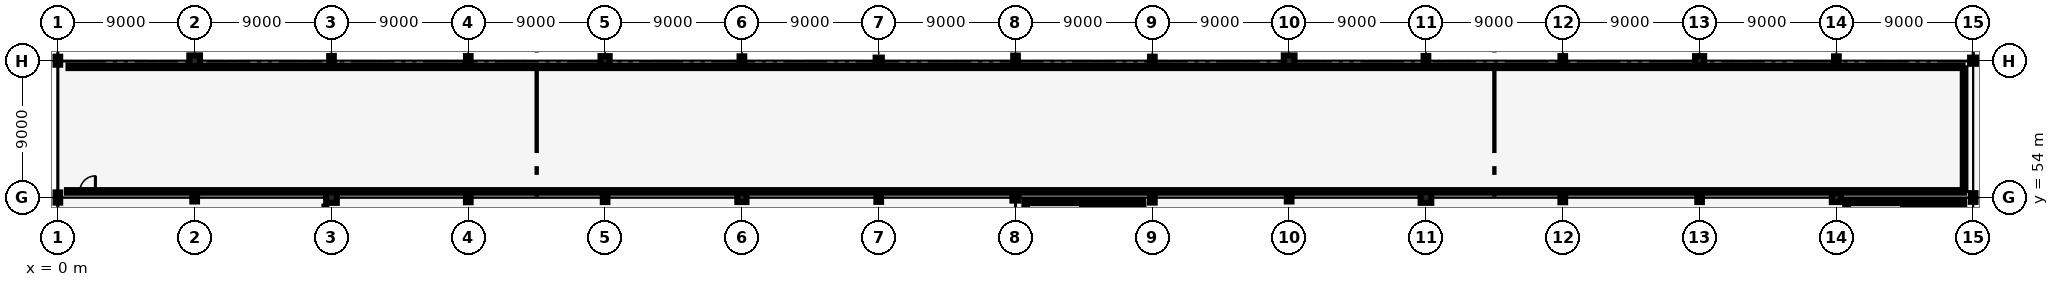
"""IFC4 building model, lengths in metres.
Left out: names, types, materials, properties, quantities, classifications, styles, units other than length and angle.
Written with IfcOpenShell. Run it as: python <this file> out.ifc"""

import sys

from ifc_helpers import new_model, si_unit, direction, frame, frame_2d, origin, origin_2d, place, context, subcontext, project, spatial, rectangle, hollow_circle, i_section, extrude, element, fill, save


model = new_model("IFC4")
c1 = context("Model", 3, precision=1e-05, world=origin(), true_north=direction((0.0, 1.0)))
c2 = subcontext(c1, "Body", "Model", "MODEL_VIEW")
j1 = project(units=[si_unit("LENGTHUNIT", "METRE"), si_unit("PLANEANGLEUNIT", "RADIAN")], contexts=[c1])
p1 = place(None, origin())
s1 = spatial("IfcSite", under=j1, at=p1, CompositionType="ELEMENT")
p2 = place(p1, origin())
s2 = spatial("IfcBuilding", under=s1, at=p2, CompositionType="ELEMENT")
p3 = place(p2, frame((0.0, 0.0, 12.0)))
s3 = spatial("IfcBuildingStorey", under=s2, at=p3, CompositionType="ELEMENT", Elevation=12.0)
p4 = place(p3, frame((0.0, 54.0, 0.0), z_axis=(0.0, 0.0, 1.0), x_axis=(1.0, 0.0, 0.0)))
e1 = element("IfcColumn", 1, at=p4, inside=s3, PredefinedType="COLUMN", context=c2, shape_type="SweptSolid", body=[
    extrude(i_section(OverallWidth=0.305, OverallDepth=0.668, WebThickness=0.021, FlangeThickness=0.04, FilletRadius=0.027, at=origin_2d()), origin(), (0.0, 0.0, 1.0), 6.0),
])
p5 = place(p3, frame((0.0, 63.0, 0.0), z_axis=(0.0, 0.0, 1.0), x_axis=(1.0, 0.0, 0.0)))
e2 = element("IfcColumn", 2, at=p5, inside=s3, PredefinedType="COLUMN", context=c2, shape_type="SweptSolid", body=[
    extrude(i_section(OverallWidth=0.306, OverallDepth=0.524, WebThickness=0.021, FlangeThickness=0.04, FilletRadius=0.027, at=origin_2d()), origin(), (0.0, 0.0, 1.0), 5.655),
])
p6 = place(p3, frame((9.0, 54.0, 0.0), z_axis=(0.0, 0.0, 1.0), x_axis=(1.0, 0.0, 0.0)))
e3 = element("IfcColumn", 3, at=p6, inside=s3, PredefinedType="COLUMN", context=c2, shape_type="SweptSolid", body=[
    extrude(i_section(OverallWidth=0.306, OverallDepth=0.524, WebThickness=0.021, FlangeThickness=0.04, FilletRadius=0.027, at=origin_2d()), origin(), (0.0, 0.0, 1.0), 6.0),
])
p7 = place(p3, frame((9.0, 63.0, 0.0), z_axis=(0.0, 0.0, 1.0), x_axis=(1.0, 0.0, 0.0)))
e4 = element("IfcColumn", 4, at=p7, inside=s3, PredefinedType="COLUMN", context=c2, shape_type="SweptSolid", body=[
    extrude(rectangle(XDim=0.7, YDim=0.7, at=origin_2d()), origin(), (0.0, 0.0, 1.0), 5.655),
])
p8 = place(p3, frame((18.0, 54.0, 0.0), z_axis=(0.0, 0.0, 1.0), x_axis=(1.0, 0.0, 0.0)))
e5 = element("IfcColumn", 5, at=p8, inside=s3, PredefinedType="COLUMN", context=c2, shape_type="SweptSolid", body=[
    extrude(rectangle(XDim=0.7, YDim=0.7, at=origin_2d()), origin(), (0.0, 0.0, 1.0), 6.0),
])
p9 = place(p3, frame((18.0, 63.0, 0.0), z_axis=(0.0, 0.0, 1.0), x_axis=(1.0, 0.0, 0.0)))
e6 = element("IfcColumn", 6, at=p9, inside=s3, PredefinedType="COLUMN", context=c2, shape_type="SweptSolid", body=[
    extrude(i_section(OverallWidth=0.305, OverallDepth=0.62, WebThickness=0.021, FlangeThickness=0.04, FilletRadius=0.027, at=origin_2d()), origin(), (0.0, 0.0, 1.0), 5.655),
])
p10 = place(p3, frame((27.0, 54.0, 0.0), z_axis=(0.0, 0.0, 1.0), x_axis=(1.0, 0.0, 0.0)))
e7 = element("IfcColumn", 7, at=p10, inside=s3, PredefinedType="COLUMN", context=c2, shape_type="SweptSolid", body=[
    extrude(i_section(OverallWidth=0.305, OverallDepth=0.62, WebThickness=0.021, FlangeThickness=0.04, FilletRadius=0.027, at=origin_2d()), origin(), (0.0, 0.0, 1.0), 6.0),
])
p11 = place(p3, frame((27.0, 63.0, 0.0), z_axis=(0.0, 0.0, 1.0), x_axis=(1.0, 0.0, 0.0)))
e8 = element("IfcColumn", 8, at=p11, inside=s3, PredefinedType="COLUMN", context=c2, shape_type="SweptSolid", body=[
    extrude(i_section(OverallWidth=0.3, OverallDepth=0.6, WebThickness=0.015, FlangeThickness=0.03, FilletRadius=0.027, at=origin_2d()), origin(), (0.0, 0.0, 1.0), 5.655),
])
p12 = place(p3, frame((36.0, 54.0, 0.0), z_axis=(0.0, 0.0, 1.0), x_axis=(1.0, 0.0, 0.0)))
e9 = element("IfcColumn", 9, at=p12, inside=s3, PredefinedType="COLUMN", context=c2, shape_type="SweptSolid", body=[
    extrude(i_section(OverallWidth=0.3, OverallDepth=0.6, WebThickness=0.015, FlangeThickness=0.03, FilletRadius=0.027, at=origin_2d()), origin(), (0.0, 0.0, 1.0), 6.0),
])
p13 = place(p3, frame((36.0, 63.0, 0.0), z_axis=(0.0, 0.0, 1.0), x_axis=(1.0, 0.0, 0.0)))
e10 = element("IfcColumn", 10, at=p13, inside=s3, PredefinedType="COLUMN", context=c2, shape_type="SweptSolid", body=[
    extrude(rectangle(XDim=0.6, YDim=0.6, at=origin_2d()), origin(), (0.0, 0.0, 1.0), 5.655),
])
p14 = place(p3, frame((45.0, 54.0, 0.0), z_axis=(0.0, 0.0, 1.0), x_axis=(1.0, 0.0, 0.0)))
e11 = element("IfcColumn", 11, at=p14, inside=s3, PredefinedType="COLUMN", context=c2, shape_type="SweptSolid", body=[
    extrude(rectangle(XDim=0.6, YDim=0.6, at=origin_2d()), origin(), (0.0, 0.0, 1.0), 6.0),
])
p15 = place(p3, frame((45.0, 63.0, 0.0), z_axis=(0.0, 0.0, 1.0), x_axis=(1.0, 0.0, 0.0)))
e12 = element("IfcColumn", 12, at=p15, inside=s3, PredefinedType="COLUMN", context=c2, shape_type="SweptSolid", body=[
    extrude(i_section(OverallWidth=0.306, OverallDepth=0.572, WebThickness=0.021, FlangeThickness=0.04, FilletRadius=0.027, at=origin_2d()), origin(), (0.0, 0.0, 1.0), 5.655),
])
p16 = place(p3, frame((54.0, 54.0, 0.0), z_axis=(0.0, 0.0, 1.0), x_axis=(1.0, 0.0, 0.0)))
e13 = element("IfcColumn", 13, at=p16, inside=s3, PredefinedType="COLUMN", context=c2, shape_type="SweptSolid", body=[
    extrude(i_section(OverallWidth=0.306, OverallDepth=0.572, WebThickness=0.021, FlangeThickness=0.04, FilletRadius=0.027, at=origin_2d()), origin(), (0.0, 0.0, 1.0), 6.0),
])
p17 = place(p3, frame((54.0, 63.0, 0.0), z_axis=(0.0, 0.0, 1.0), x_axis=(1.0, 0.0, 0.0)))
e14 = element("IfcColumn", 14, at=p17, inside=s3, PredefinedType="COLUMN", context=c2, shape_type="SweptSolid", body=[
    extrude(hollow_circle(Radius=0.203, WallThickness=0.016, at=origin_2d()), origin(), (0.0, 0.0, 1.0), 5.655),
])
p18 = place(p3, frame((63.0, 54.0, 0.0), z_axis=(0.0, 0.0, 1.0), x_axis=(1.0, 0.0, 0.0)))
e15 = element("IfcColumn", 15, at=p18, inside=s3, PredefinedType="COLUMN", context=c2, shape_type="SweptSolid", body=[
    extrude(hollow_circle(Radius=0.203, WallThickness=0.016, at=origin_2d()), origin(), (0.0, 0.0, 1.0), 6.0),
])
p19 = place(p3, frame((63.0, 63.0, 0.0), z_axis=(0.0, 0.0, 1.0), x_axis=(1.0, 0.0, 0.0)))
e16 = element("IfcColumn", 16, at=p19, inside=s3, PredefinedType="COLUMN", context=c2, shape_type="SweptSolid", body=[
    extrude(i_section(OverallWidth=0.305, OverallDepth=0.668, WebThickness=0.021, FlangeThickness=0.04, FilletRadius=0.027, at=origin_2d()), origin(), (0.0, 0.0, 1.0), 5.655),
])
p20 = place(p3, frame((72.0, 54.0, 0.0), z_axis=(0.0, 0.0, 1.0), x_axis=(1.0, 0.0, 0.0)))
e17 = element("IfcColumn", 17, at=p20, inside=s3, PredefinedType="COLUMN", context=c2, shape_type="SweptSolid", body=[
    extrude(i_section(OverallWidth=0.305, OverallDepth=0.668, WebThickness=0.021, FlangeThickness=0.04, FilletRadius=0.027, at=origin_2d()), origin(), (0.0, 0.0, 1.0), 6.0),
])
p21 = place(p3, frame((72.0, 63.0, 0.0), z_axis=(0.0, 0.0, 1.0), x_axis=(1.0, 0.0, 0.0)))
e18 = element("IfcColumn", 18, at=p21, inside=s3, PredefinedType="COLUMN", context=c2, shape_type="SweptSolid", body=[
    extrude(i_section(OverallWidth=0.306, OverallDepth=0.524, WebThickness=0.021, FlangeThickness=0.04, FilletRadius=0.027, at=origin_2d()), origin(), (0.0, 0.0, 1.0), 5.655),
])
p22 = place(p3, frame((81.0, 54.0, 0.0), z_axis=(0.0, 0.0, 1.0), x_axis=(1.0, 0.0, 0.0)))
e19 = element("IfcColumn", 19, at=p22, inside=s3, PredefinedType="COLUMN", context=c2, shape_type="SweptSolid", body=[
    extrude(i_section(OverallWidth=0.306, OverallDepth=0.524, WebThickness=0.021, FlangeThickness=0.04, FilletRadius=0.027, at=origin_2d()), origin(), (0.0, 0.0, 1.0), 6.0),
])
p23 = place(p3, frame((81.0, 63.0, 0.0), z_axis=(0.0, 0.0, 1.0), x_axis=(1.0, 0.0, 0.0)))
e20 = element("IfcColumn", 20, at=p23, inside=s3, PredefinedType="COLUMN", context=c2, shape_type="SweptSolid", body=[
    extrude(rectangle(XDim=0.7, YDim=0.7, at=origin_2d()), origin(), (0.0, 0.0, 1.0), 5.655),
])
p24 = place(p3, frame((90.0, 54.0, 0.0), z_axis=(0.0, 0.0, 1.0), x_axis=(1.0, 0.0, 0.0)))
e21 = element("IfcColumn", 21, at=p24, inside=s3, PredefinedType="COLUMN", context=c2, shape_type="SweptSolid", body=[
    extrude(rectangle(XDim=0.7, YDim=0.7, at=origin_2d()), origin(), (0.0, 0.0, 1.0), 6.0),
])
p25 = place(p3, frame((90.0, 63.0, 0.0), z_axis=(0.0, 0.0, 1.0), x_axis=(1.0, 0.0, 0.0)))
e22 = element("IfcColumn", 22, at=p25, inside=s3, PredefinedType="COLUMN", context=c2, shape_type="SweptSolid", body=[
    extrude(i_section(OverallWidth=0.305, OverallDepth=0.62, WebThickness=0.021, FlangeThickness=0.04, FilletRadius=0.027, at=origin_2d()), origin(), (0.0, 0.0, 1.0), 5.655),
])
p26 = place(p3, frame((99.0, 54.0, 0.0), z_axis=(0.0, 0.0, 1.0), x_axis=(1.0, 0.0, 0.0)))
e23 = element("IfcColumn", 23, at=p26, inside=s3, PredefinedType="COLUMN", context=c2, shape_type="SweptSolid", body=[
    extrude(i_section(OverallWidth=0.305, OverallDepth=0.62, WebThickness=0.021, FlangeThickness=0.04, FilletRadius=0.027, at=origin_2d()), origin(), (0.0, 0.0, 1.0), 6.0),
])
p27 = place(p3, frame((99.0, 63.0, 0.0), z_axis=(0.0, 0.0, 1.0), x_axis=(1.0, 0.0, 0.0)))
e24 = element("IfcColumn", 24, at=p27, inside=s3, PredefinedType="COLUMN", context=c2, shape_type="SweptSolid", body=[
    extrude(i_section(OverallWidth=0.3, OverallDepth=0.6, WebThickness=0.015, FlangeThickness=0.03, FilletRadius=0.027, at=origin_2d()), origin(), (0.0, 0.0, 1.0), 5.655),
])
p28 = place(p3, frame((108.0, 54.0, 0.0), z_axis=(0.0, 0.0, 1.0), x_axis=(1.0, 0.0, 0.0)))
e25 = element("IfcColumn", 25, at=p28, inside=s3, PredefinedType="COLUMN", context=c2, shape_type="SweptSolid", body=[
    extrude(i_section(OverallWidth=0.3, OverallDepth=0.6, WebThickness=0.015, FlangeThickness=0.03, FilletRadius=0.027, at=origin_2d()), origin(), (0.0, 0.0, 1.0), 6.0),
])
p29 = place(p3, frame((108.0, 63.0, 0.0), z_axis=(0.0, 0.0, 1.0), x_axis=(1.0, 0.0, 0.0)))
e26 = element("IfcColumn", 26, at=p29, inside=s3, PredefinedType="COLUMN", context=c2, shape_type="SweptSolid", body=[
    extrude(rectangle(XDim=0.6, YDim=0.6, at=origin_2d()), origin(), (0.0, 0.0, 1.0), 5.655),
])
p30 = place(p3, frame((117.0, 54.0, 0.0), z_axis=(0.0, 0.0, 1.0), x_axis=(1.0, 0.0, 0.0)))
e27 = element("IfcColumn", 27, at=p30, inside=s3, PredefinedType="COLUMN", context=c2, shape_type="SweptSolid", body=[
    extrude(rectangle(XDim=0.6, YDim=0.6, at=origin_2d()), origin(), (0.0, 0.0, 1.0), 6.0),
])
p31 = place(p3, frame((117.0, 63.0, 0.0), z_axis=(0.0, 0.0, 1.0), x_axis=(1.0, 0.0, 0.0)))
e28 = element("IfcColumn", 28, at=p31, inside=s3, PredefinedType="COLUMN", context=c2, shape_type="SweptSolid", body=[
    extrude(i_section(OverallWidth=0.306, OverallDepth=0.572, WebThickness=0.021, FlangeThickness=0.04, FilletRadius=0.027, at=origin_2d()), origin(), (0.0, 0.0, 1.0), 5.655),
])
p32 = place(p3, frame((126.0, 54.0, 0.0), z_axis=(0.0, 0.0, 1.0), x_axis=(1.0, 0.0, 0.0)))
e29 = element("IfcColumn", 29, at=p32, inside=s3, PredefinedType="COLUMN", context=c2, shape_type="SweptSolid", body=[
    extrude(i_section(OverallWidth=0.306, OverallDepth=0.572, WebThickness=0.021, FlangeThickness=0.04, FilletRadius=0.027, at=origin_2d()), origin(), (0.0, 0.0, 1.0), 6.0),
])
p33 = place(p3, frame((126.0, 63.0, 0.0), z_axis=(0.0, 0.0, 1.0), x_axis=(1.0, 0.0, 0.0)))
e30 = element("IfcColumn", 30, at=p33, inside=s3, PredefinedType="COLUMN", context=c2, shape_type="SweptSolid", body=[
    extrude(hollow_circle(Radius=0.203, WallThickness=0.016, at=origin_2d()), origin(), (0.0, 0.0, 1.0), 6.0),
])
p34 = place(p3, frame((63.725, 45.47, 0.0), z_axis=(0.0, 0.0, 1.0), x_axis=(0.0, 1.0, 0.0)))
e31 = element("IfcWall", 31, at=p34, inside=s3, PredefinedType="SHEAR", context=c2, shape_type="SweptSolid", body=[
    extrude(rectangle(XDim=8.06, YDim=0.25, at=frame_2d((4.03, 0.0))), origin(), (0.0, 0.0, 1.0), 5.7),
])
p35 = place(p3, frame((71.275, 45.47, 0.0), z_axis=(0.0, 0.0, 1.0), x_axis=(0.0, 1.0, 0.0)))
e32 = element("IfcWall", 32, at=p35, inside=s3, PredefinedType="SHEAR", context=c2, shape_type="SweptSolid", body=[
    extrude(rectangle(XDim=8.06, YDim=0.25, at=frame_2d((4.03, 0.0))), origin(), (0.0, 0.0, 1.0), 5.7),
])
p36 = place(p35, frame((1.15, 0.0, 0.0)))
e33 = element("IfcOpeningElement", 33, at=p36, cuts=e32, PredefinedType="OPENING", context=c2, shape_type="SweptSolid", body=[
    extrude(rectangle(XDim=1.6, YDim=2.2, at=frame_2d((0.8, 1.1))), frame((0.0, 0.135, 0.0), z_axis=(0.0, -1.0, 0.0), x_axis=(1.0, 0.0, 0.0)), (0.0, 0.0, 1.0), 0.27),
])
p37 = place(p3, frame((63.6, 53.655, 0.0), z_axis=(0.0, 0.0, 1.0), x_axis=(1.0, 0.0, 0.0)))
e34 = element("IfcWall", 34, at=p37, inside=s3, PredefinedType="SHEAR", context=c2, shape_type="SweptSolid", body=[
    extrude(rectangle(XDim=7.8, YDim=0.25, at=frame_2d((3.9, 0.0))), origin(), (0.0, 0.0, 1.0), 5.7),
])
p38 = place(p3, frame((67.415, 45.47, 0.0), z_axis=(0.0, 0.0, 1.0), x_axis=(0.0, 1.0, 0.0)))
e35 = element("IfcWall", 35, at=p38, inside=s3, PredefinedType="SHEAR", context=c2, shape_type="SweptSolid", body=[
    extrude(rectangle(XDim=8.06, YDim=0.25, at=frame_2d((4.03, 0.0))), origin(), (0.0, 0.0, 1.0), 5.7),
])
p39 = place(p38, frame((0.25, 0.0, 0.0)))
e36 = element("IfcOpeningElement", 36, at=p39, cuts=e35, PredefinedType="OPENING", context=c2, shape_type="SweptSolid", body=[
    extrude(rectangle(XDim=1.15, YDim=2.15, at=frame_2d((0.575, 1.075))), frame((0.0, 0.135, 0.0), z_axis=(0.0, -1.0, 0.0), x_axis=(1.0, 0.0, 0.0)), (0.0, 0.0, 1.0), 0.27),
])
p40 = place(p3, frame((117.725, 45.47, 0.0), z_axis=(0.0, 0.0, 1.0), x_axis=(0.0, 1.0, 0.0)))
e37 = element("IfcWall", 37, at=p40, inside=s3, PredefinedType="SHEAR", context=c2, shape_type="SweptSolid", body=[
    extrude(rectangle(XDim=8.06, YDim=0.25, at=frame_2d((4.03, 0.0))), origin(), (0.0, 0.0, 1.0), 5.7),
])
p41 = place(p3, frame((125.275, 45.47, 0.0), z_axis=(0.0, 0.0, 1.0), x_axis=(0.0, 1.0, 0.0)))
e38 = element("IfcWall", 38, at=p41, inside=s3, PredefinedType="SHEAR", context=c2, shape_type="SweptSolid", body=[
    extrude(rectangle(XDim=8.06, YDim=0.25, at=frame_2d((4.03, 0.0))), origin(), (0.0, 0.0, 1.0), 5.7),
])
p42 = place(p41, frame((1.15, 0.0, 0.0)))
e39 = element("IfcOpeningElement", 39, at=p42, cuts=e38, PredefinedType="OPENING", context=c2, shape_type="SweptSolid", body=[
    extrude(rectangle(XDim=1.6, YDim=2.2, at=frame_2d((0.8, 1.1))), frame((0.0, 0.135, 0.0), z_axis=(0.0, -1.0, 0.0), x_axis=(1.0, 0.0, 0.0)), (0.0, 0.0, 1.0), 0.27),
])
p43 = place(p3, frame((117.6, 53.655, 0.0), z_axis=(0.0, 0.0, 1.0), x_axis=(1.0, 0.0, 0.0)))
e40 = element("IfcWall", 40, at=p43, inside=s3, PredefinedType="SHEAR", context=c2, shape_type="SweptSolid", body=[
    extrude(rectangle(XDim=7.8, YDim=0.25, at=frame_2d((3.9, 0.0))), origin(), (0.0, 0.0, 1.0), 5.7),
])
p44 = place(p3, frame((121.415, 45.47, 0.0), z_axis=(0.0, 0.0, 1.0), x_axis=(0.0, 1.0, 0.0)))
e41 = element("IfcWall", 41, at=p44, inside=s3, PredefinedType="SHEAR", context=c2, shape_type="SweptSolid", body=[
    extrude(rectangle(XDim=8.06, YDim=0.25, at=frame_2d((4.03, 0.0))), origin(), (0.0, 0.0, 1.0), 5.7),
])
p45 = place(p44, frame((0.25, 0.0, 0.0)))
e42 = element("IfcOpeningElement", 42, at=p45, cuts=e41, PredefinedType="OPENING", context=c2, shape_type="SweptSolid", body=[
    extrude(rectangle(XDim=1.15, YDim=2.15, at=frame_2d((0.575, 1.075))), frame((0.0, 0.135, 0.0), z_axis=(0.0, -1.0, 0.0), x_axis=(1.0, 0.0, 0.0)), (0.0, 0.0, 1.0), 0.27),
])
p46 = place(p3, frame((0.6, 54.4, 0.0), z_axis=(0.0, 0.0, 1.0), x_axis=(1.0, 0.0, 0.0)))
e43 = element("IfcWall", 43, at=p46, inside=s3, PredefinedType="PARTITIONING", context=c2, shape_type="SweptSolid", body=[
    extrude(rectangle(XDim=124.8, YDim=0.17, at=frame_2d((62.4, 0.0))), origin(), (0.0, 0.0, 1.0), 4.75),
])
p47 = place(p46, frame((0.85, 0.0, 0.0)))
e44 = element("IfcOpeningElement", 44, at=p47, cuts=e43, PredefinedType="OPENING", context=c2, shape_type="SweptSolid", body=[
    extrude(rectangle(XDim=1.02, YDim=2.15, at=frame_2d((0.51, 1.075))), frame((0.0, 0.095, 0.0), z_axis=(0.0, -1.0, 0.0), x_axis=(1.0, 0.0, 0.0)), (0.0, 0.0, 1.0), 0.19),
])
p48 = place(p3, frame((0.702, 62.6, 0.0), z_axis=(0.0, 0.0, 1.0), x_axis=(1.0, 0.0, 0.0)))
e45 = element("IfcWall", 45, at=p48, inside=s3, PredefinedType="PARTITIONING", context=c2, shape_type="SweptSolid", body=[
    extrude(rectangle(XDim=124.596, YDim=0.17, at=frame_2d((62.298, 0.0))), origin(), (0.0, 0.0, 1.0), 4.75),
])
p49 = place(p3, frame((125.4, 54.502, 0.0), z_axis=(0.0, 0.0, 1.0), x_axis=(0.0, 1.0, 0.0)))
e46 = element("IfcWall", 46, at=p49, inside=s3, PredefinedType="PARTITIONING", context=c2, shape_type="SweptSolid", body=[
    extrude(rectangle(XDim=7.996, YDim=0.17, at=frame_2d((3.998, 0.0))), origin(), (0.0, 0.0, 1.0), 4.75),
])
p50 = place(p47, origin())
e47 = element("IfcDoor", 47, at=p50, inside=s3, OperationType="SINGLE_SWING_RIGHT", PredefinedType="DOOR", context=c2, shape_type="SweptSolid", body=[
    extrude(rectangle(XDim=1.02, YDim=2.15, at=frame_2d((0.51, 1.075))), frame((0.0, 0.025, 0.0), z_axis=(0.0, -1.0, 0.0), x_axis=(1.0, 0.0, 0.0)), (0.0, 0.0, 1.0), 0.05),
])
fill(e44, e47)
save(model, sys.argv[1])
